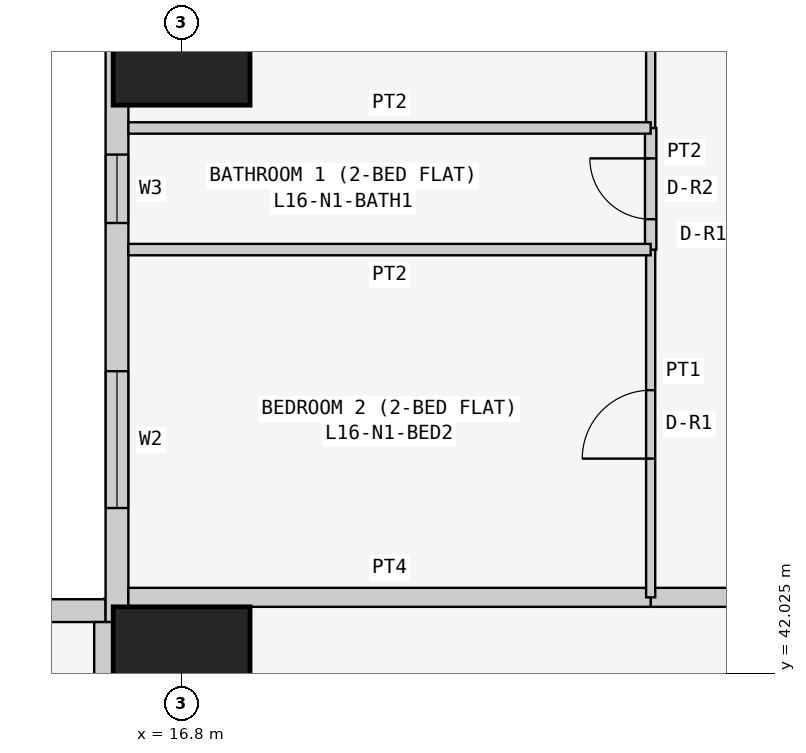
"""IFC4 building model, lengths in metres.
Left out: names, types, materials, properties, quantities, classifications, styles, units other than length and angle.
Written with IfcOpenShell. Run it as: python <this file> out.ifc"""

import sys

from ifc_helpers import new_model, si_unit, direction, frame, frame_2d, origin, origin_2d, place, context, subcontext, project, spatial, rectangle, extrude, element, fill, save


model = new_model("IFC4")
c1 = context("Model", 3, precision=1e-05, world=origin(), true_north=direction((0.0, 1.0)))
c2 = subcontext(c1, "Body", "Model", "MODEL_VIEW")
j1 = project(units=[si_unit("LENGTHUNIT", "METRE"), si_unit("PLANEANGLEUNIT", "RADIAN")], contexts=[c1])
p1 = place(None, origin())
s1 = spatial("IfcSite", under=j1, at=p1, CompositionType="ELEMENT")
p2 = place(p1, origin())
s2 = spatial("IfcBuilding", under=s1, at=p2, CompositionType="ELEMENT")
p3 = place(p2, frame((0.0, 0.0, 66.9)))
s3 = spatial("IfcBuildingStorey", under=s2, at=p3, CompositionType="ELEMENT", Elevation=66.9)
for number, where, z_axis, x_axis in (
    (1, (16.8, 42.0, 0.0), (0.0, 0.0, 1.0), (1.0, 0.0, 0.0)),
    (2, (16.8, 50.4, 0.0), (0.0, 0.0, 1.0), (1.0, 0.0, 0.0)),
):
    element("IfcColumn", number, at=place(p3, frame(where, z_axis=z_axis, x_axis=x_axis)), inside=s3, PredefinedType="COLUMN", context=c2, shape_type="SweptSolid", body=[
        extrude(rectangle(XDim=1.8, YDim=1.8, at=origin_2d()), origin(), (0.0, 0.0, 1.0), 3.6),
    ])
p4 = place(p3, frame((15.8, 42.85, 0.0), z_axis=(0.0, 0.0, 1.0), x_axis=(-1.0, 0.0, 0.0)))
e3 = element("IfcWall", 3, at=p4, inside=s3, PredefinedType="SOLIDWALL", context=c2, shape_type="SweptSolid", body=[
    extrude(rectangle(XDim=15.4, YDim=0.3, at=frame_2d((7.7, 0.0))), origin(), (0.0, 0.0, 1.0), 3.45),
])
p5 = place(p4, frame((1.2, 0.0, 0.9)))
e4 = element("IfcOpeningElement", 4, at=p5, cuts=e3, PredefinedType="OPENING", context=c2, shape_type="SweptSolid", body=[
    extrude(rectangle(XDim=1.8, YDim=1.5, at=frame_2d((0.9, 0.75))), frame((0.0, 0.16, 0.0), z_axis=(0.0, -1.0, 0.0), x_axis=(1.0, 0.0, 0.0)), (0.0, 0.0, 1.0), 0.32),
])
p6 = place(p4, frame((4.95, 0.0, 1.5)))
e5 = element("IfcOpeningElement", 5, at=p6, cuts=e3, PredefinedType="OPENING", context=c2, shape_type="SweptSolid", body=[
    extrude(rectangle(XDim=0.9, YDim=0.7, at=frame_2d((0.45, 0.35))), frame((0.0, 0.16, 0.0), z_axis=(0.0, -1.0, 0.0), x_axis=(1.0, 0.0, 0.0)), (0.0, 0.0, 1.0), 0.32),
])
p7 = place(p4, frame((8.5, 0.0, 0.9)))
e6 = element("IfcOpeningElement", 6, at=p7, cuts=e3, PredefinedType="OPENING", context=c2, shape_type="SweptSolid", body=[
    extrude(rectangle(XDim=1.8, YDim=1.5, at=frame_2d((0.9, 0.75))), frame((0.0, 0.16, 0.0), z_axis=(0.0, -1.0, 0.0), x_axis=(1.0, 0.0, 0.0)), (0.0, 0.0, 1.0), 0.32),
])
p8 = place(p4, frame((12.5, 0.0, 0.0)))
e7 = element("IfcOpeningElement", 7, at=p8, cuts=e3, PredefinedType="OPENING", context=c2, shape_type="SweptSolid", body=[
    extrude(rectangle(XDim=0.9, YDim=2.4, at=frame_2d((0.45, 1.2))), frame((0.0, 0.16, 0.0), z_axis=(0.0, -1.0, 0.0), x_axis=(1.0, 0.0, 0.0)), (0.0, 0.0, 1.0), 0.32),
])
p9 = place(p4, frame((13.5, 0.0, 0.9)))
e8 = element("IfcOpeningElement", 8, at=p9, cuts=e3, PredefinedType="OPENING", context=c2, shape_type="SweptSolid", body=[
    extrude(rectangle(XDim=1.2, YDim=1.5, at=frame_2d((0.6, 0.75))), frame((0.0, 0.16, 0.0), z_axis=(0.0, -1.0, 0.0), x_axis=(1.0, 0.0, 0.0)), (0.0, 0.0, 1.0), 0.32),
])
p10 = place(p3, frame((15.95, 58.4, 0.0), z_axis=(0.0, 0.0, 1.0), x_axis=(0.0, -1.0, 0.0)))
e9 = element("IfcWall", 9, at=p10, inside=s3, PredefinedType="SOLIDWALL", context=c2, shape_type="SweptSolid", body=[
    extrude(rectangle(XDim=15.7, YDim=0.3, at=frame_2d((7.85, 0.0))), origin(), (0.0, 0.0, 1.0), 3.45),
])
p11 = place(p10, frame((12.4, 0.0, 0.9)))
e10 = element("IfcOpeningElement", 10, at=p11, cuts=e9, PredefinedType="OPENING", context=c2, shape_type="SweptSolid", body=[
    extrude(rectangle(XDim=1.8, YDim=1.5, at=frame_2d((0.9, 0.75))), frame((0.0, 0.16, 0.0), z_axis=(0.0, -1.0, 0.0), x_axis=(1.0, 0.0, 0.0)), (0.0, 0.0, 1.0), 0.32),
])
p12 = place(p10, frame((9.55, 0.0, 1.5)))
e11 = element("IfcOpeningElement", 11, at=p12, cuts=e9, PredefinedType="OPENING", context=c2, shape_type="SweptSolid", body=[
    extrude(rectangle(XDim=0.9, YDim=0.7, at=frame_2d((0.45, 0.35))), frame((0.0, 0.16, 0.0), z_axis=(0.0, -1.0, 0.0), x_axis=(1.0, 0.0, 0.0)), (0.0, 0.0, 1.0), 0.32),
])
p13 = place(p10, frame((5.1, 0.0, 0.9)))
e12 = element("IfcOpeningElement", 12, at=p13, cuts=e9, PredefinedType="OPENING", context=c2, shape_type="SweptSolid", body=[
    extrude(rectangle(XDim=1.8, YDim=1.5, at=frame_2d((0.9, 0.75))), frame((0.0, 0.16, 0.0), z_axis=(0.0, -1.0, 0.0), x_axis=(1.0, 0.0, 0.0)), (0.0, 0.0, 1.0), 0.32),
])
p14 = place(p10, frame((2.0, 0.0, 0.0)))
e13 = element("IfcOpeningElement", 13, at=p14, cuts=e9, PredefinedType="OPENING", context=c2, shape_type="SweptSolid", body=[
    extrude(rectangle(XDim=0.9, YDim=2.4, at=frame_2d((0.45, 1.2))), frame((0.0, 0.16, 0.0), z_axis=(0.0, -1.0, 0.0), x_axis=(1.0, 0.0, 0.0)), (0.0, 0.0, 1.0), 0.32),
])
p15 = place(p10, frame((0.7, 0.0, 0.9)))
e14 = element("IfcOpeningElement", 14, at=p15, cuts=e9, PredefinedType="OPENING", context=c2, shape_type="SweptSolid", body=[
    extrude(rectangle(XDim=1.2, YDim=1.5, at=frame_2d((0.6, 0.75))), frame((0.0, 0.16, 0.0), z_axis=(0.0, -1.0, 0.0), x_axis=(1.0, 0.0, 0.0)), (0.0, 0.0, 1.0), 0.32),
])
p16 = place(p3, frame((22.971, 43.025, 0.0), z_axis=(0.0, 0.0, 1.0), x_axis=(1.0, 0.0, 0.0)))
e15 = element("IfcWall", 15, at=p16, inside=s3, PredefinedType="PARTITIONING", context=c2, shape_type="SweptSolid", body=[
    extrude(rectangle(XDim=1.2, YDim=0.25, at=frame_2d((0.6, 0.0))), origin(), (0.0, 0.0, 1.0), 3.45),
])
p17 = place(p3, frame((16.1, 43.025, 0.0), z_axis=(0.0, 0.0, 1.0), x_axis=(1.0, 0.0, 0.0)))
e16 = element("IfcWall", 16, at=p17, inside=s3, PredefinedType="PARTITIONING", context=c2, shape_type="SweptSolid", body=[
    extrude(rectangle(XDim=6.871, YDim=0.25, at=frame_2d((3.436, 0.0))), origin(), (0.0, 0.0, 1.0), 3.45),
])
p18 = place(p3, frame((15.775, 36.229, 0.0), z_axis=(0.0, 0.0, 1.0), x_axis=(0.0, 1.0, 0.0)))
e17 = element("IfcWall", 17, at=p18, inside=s3, PredefinedType="PARTITIONING", context=c2, shape_type="SweptSolid", body=[
    extrude(rectangle(XDim=6.471, YDim=0.25, at=frame_2d((3.235, 0.0))), origin(), (0.0, 0.0, 1.0), 3.45),
])
p19 = place(p3, frame((22.971, 47.6, 0.0), z_axis=(0.0, 0.0, 1.0), x_axis=(0.0, -1.0, 0.0)))
e18 = element("IfcWall", 18, at=p19, inside=s3, PredefinedType="PARTITIONING", context=c2, shape_type="SweptSolid", body=[
    extrude(rectangle(XDim=4.575, YDim=0.12, at=frame_2d((2.288, 0.0))), origin(), (0.0, 0.0, 1.0), 3.45),
])
p20 = place(p19, frame((1.85, 0.0, 0.0)))
e19 = element("IfcOpeningElement", 19, at=p20, cuts=e18, PredefinedType="OPENING", context=c2, shape_type="SweptSolid", body=[
    extrude(rectangle(XDim=0.9, YDim=2.1, at=frame_2d((0.45, 1.05))), frame((0.0, 0.07, 0.0), z_axis=(0.0, -1.0, 0.0), x_axis=(1.0, 0.0, 0.0)), (0.0, 0.0, 1.0), 0.14),
])
p21 = place(p3, frame((22.971, 49.2, 0.0), z_axis=(0.0, 0.0, 1.0), x_axis=(0.0, -1.0, 0.0)))
e20 = element("IfcWall", 20, at=p21, inside=s3, PredefinedType="PARTITIONING", context=c2, shape_type="SweptSolid", body=[
    extrude(rectangle(XDim=1.6, YDim=0.15, at=frame_2d((0.8, 0.0))), origin(), (0.0, 0.0, 1.0), 3.45),
])
p22 = place(p21, frame((0.4, 0.0, 0.0)))
e21 = element("IfcOpeningElement", 21, at=p22, cuts=e20, PredefinedType="OPENING", context=c2, shape_type="SweptSolid", body=[
    extrude(rectangle(XDim=0.8, YDim=2.1, at=frame_2d((0.4, 1.05))), frame((0.0, 0.085, 0.0), z_axis=(0.0, -1.0, 0.0), x_axis=(1.0, 0.0, 0.0)), (0.0, 0.0, 1.0), 0.17),
])
p23 = place(p3, frame((22.971, 53.0, 0.0), z_axis=(0.0, 0.0, 1.0), x_axis=(0.0, -1.0, 0.0)))
e22 = element("IfcWall", 22, at=p23, inside=s3, PredefinedType="PARTITIONING", context=c2, shape_type="SweptSolid", body=[
    extrude(rectangle(XDim=3.8, YDim=0.12, at=frame_2d((1.9, 0.0))), origin(), (0.0, 0.0, 1.0), 3.45),
])
p24 = place(p23, frame((0.55, 0.0, 0.0)))
e23 = element("IfcOpeningElement", 23, at=p24, cuts=e22, PredefinedType="OPENING", context=c2, shape_type="SweptSolid", body=[
    extrude(rectangle(XDim=0.9, YDim=2.1, at=frame_2d((0.45, 1.05))), frame((0.0, 0.07, 0.0), z_axis=(0.0, -1.0, 0.0), x_axis=(1.0, 0.0, 0.0)), (0.0, 0.0, 1.0), 0.14),
])
for number, where, z_axis, x_axis in (
    (24, (22.971, 47.6, 0.0), (0.0, 0.0, 1.0), (-1.0, 0.0, 0.0)),
    (25, (22.971, 49.2, 0.0), (0.0, 0.0, 1.0), (-1.0, 0.0, 0.0)),
):
    element("IfcWall", number, at=place(p3, frame(where, z_axis=z_axis, x_axis=x_axis)), inside=s3, PredefinedType="PARTITIONING", context=c2, shape_type="SweptSolid", body=[
        extrude(rectangle(XDim=6.871, YDim=0.15, at=frame_2d((3.436, 0.0))), origin(), (0.0, 0.0, 1.0), 3.45),
    ])
p25 = place(p11, origin())
e26 = element("IfcWindow", 26, at=p25, inside=s3, PartitioningType="SINGLE_PANEL", PredefinedType="WINDOW", context=c2, shape_type="SweptSolid", body=[
    extrude(rectangle(XDim=1.8, YDim=1.5, at=frame_2d((0.9, 0.75))), frame((0.0, 0.03, 0.0), z_axis=(0.0, -1.0, 0.0), x_axis=(1.0, 0.0, 0.0)), (0.0, 0.0, 1.0), 0.06),
])
fill(e10, e26)
p26 = place(p12, origin())
e27 = element("IfcWindow", 27, at=p26, inside=s3, PartitioningType="SINGLE_PANEL", PredefinedType="WINDOW", context=c2, shape_type="SweptSolid", body=[
    extrude(rectangle(XDim=0.9, YDim=0.7, at=frame_2d((0.45, 0.35))), frame((0.0, 0.03, 0.0), z_axis=(0.0, -1.0, 0.0), x_axis=(1.0, 0.0, 0.0)), (0.0, 0.0, 1.0), 0.06),
])
fill(e11, e27)
p27 = place(p20, frame((0.9, 0.0, 0.0), z_axis=(0.0, 0.0, 1.0), x_axis=(-1.0, 0.0, 0.0)))
e28 = element("IfcDoor", 28, at=p27, inside=s3, OperationType="SINGLE_SWING_LEFT", PredefinedType="DOOR", context=c2, shape_type="SweptSolid", body=[
    extrude(rectangle(XDim=0.9, YDim=2.1, at=frame_2d((0.45, 1.05))), frame((0.0, 0.025, 0.0), z_axis=(0.0, -1.0, 0.0), x_axis=(1.0, 0.0, 0.0)), (0.0, 0.0, 1.0), 0.05),
])
fill(e19, e28)
p28 = place(p22, frame((0.8, 0.0, 0.0), z_axis=(0.0, 0.0, 1.0), x_axis=(-1.0, 0.0, 0.0)))
e29 = element("IfcDoor", 29, at=p28, inside=s3, OperationType="SINGLE_SWING_RIGHT", PredefinedType="DOOR", context=c2, shape_type="SweptSolid", body=[
    extrude(rectangle(XDim=0.8, YDim=2.1, at=frame_2d((0.4, 1.05))), frame((0.0, 0.025, 0.0), z_axis=(0.0, -1.0, 0.0), x_axis=(1.0, 0.0, 0.0)), (0.0, 0.0, 1.0), 0.05),
])
fill(e21, e29)
save(model, sys.argv[1])
